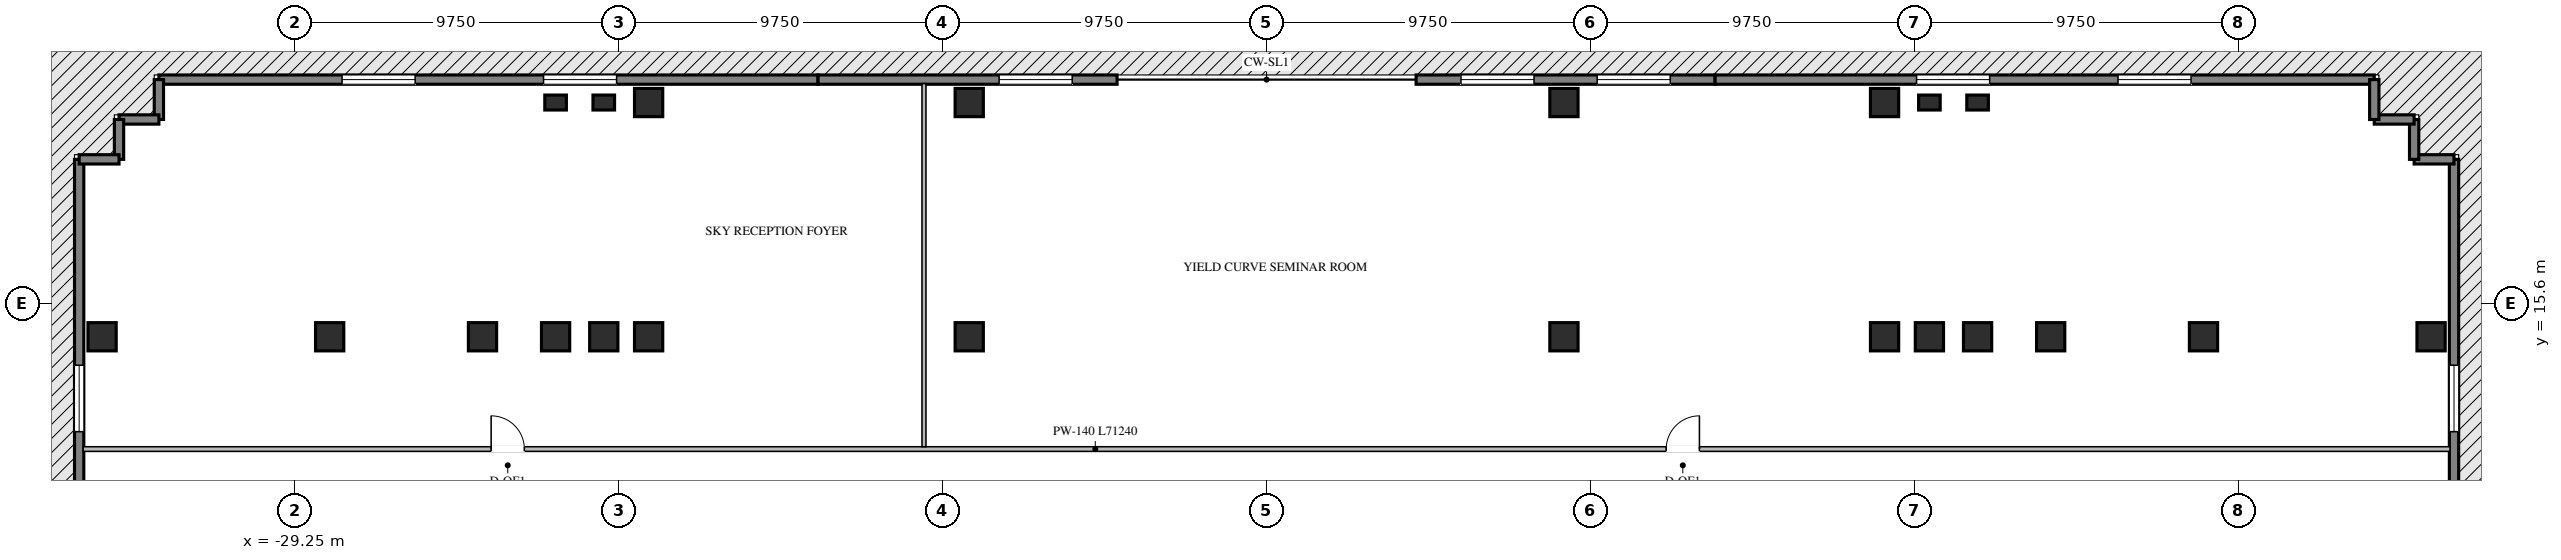
"""IFC4 building model, lengths in metres.
Left out: names, types, materials, properties, quantities, classifications, styles, units other than length and angle.
Written with IfcOpenShell. Run it as: python <this file> out.ifc"""

import sys

from ifc_helpers import new_model, si_unit, direction, frame, frame_2d, origin, origin_2d, place, context, subcontext, project, spatial, rectangle, i_section, extrude, element, fill, save


model = new_model("IFC4")
c1 = context("Model", 3, precision=1e-05, world=origin(), true_north=direction((0.0, 1.0)))
c2 = subcontext(c1, "Body", "Model", "MODEL_VIEW")
j1 = project(units=[si_unit("LENGTHUNIT", "METRE"), si_unit("PLANEANGLEUNIT", "RADIAN")], contexts=[c1])
p1 = place(None, origin())
s1 = spatial("IfcSite", under=j1, at=p1, CompositionType="ELEMENT")
p2 = place(p1, origin())
s2 = spatial("IfcBuilding", under=s1, at=p2, CompositionType="ELEMENT")
p3 = place(p2, frame((0.0, 0.0, 27.0)))
s3 = spatial("IfcBuildingStorey", under=s2, at=p3, CompositionType="ELEMENT", Elevation=27.0)
for number, where, z_axis, x_axis in (
    (1, (-21.4, 14.6, 0.0), (0.0, 0.0, 1.0), (1.0, 0.0, 0.0)),
    (2, (-19.95, 14.6, 0.0), (0.0, 0.0, 1.0), (1.0, 0.0, 0.0)),
    (3, (-18.6, 14.6, 0.0), (0.0, 0.0, 1.0), (1.0, 0.0, 0.0)),
    (4, (-8.95, 14.6, 0.0), (0.0, 0.0, 1.0), (1.0, 0.0, 0.0)),
    (5, (8.95, 14.6, 0.0), (0.0, 0.0, 1.0), (1.0, 0.0, 0.0)),
    (6, (18.6, 14.6, 0.0), (0.0, 0.0, 1.0), (1.0, 0.0, 0.0)),
    (7, (19.95, 14.6, 0.0), (0.0, 0.0, 1.0), (1.0, 0.0, 0.0)),
    (8, (21.4, 14.6, 0.0), (0.0, 0.0, 1.0), (1.0, 0.0, 0.0)),
    (9, (-23.6, 14.6, 0.0), (0.0, 0.0, 1.0), (1.0, 0.0, 0.0)),
    (10, (23.6, 14.6, 0.0), (0.0, 0.0, 1.0), (1.0, 0.0, 0.0)),
    (11, (-28.2, 14.6, 0.0), (0.0, 0.0, 1.0), (1.0, 0.0, 0.0)),
    (12, (28.2, 14.6, 0.0), (0.0, 0.0, 1.0), (1.0, 0.0, 0.0)),
    (13, (-18.6, 21.65, 0.0), (0.0, 0.0, 1.0), (1.0, 0.0, 0.0)),
    (14, (-8.95, 21.65, 0.0), (0.0, 0.0, 1.0), (1.0, 0.0, 0.0)),
    (15, (8.95, 21.65, 0.0), (0.0, 0.0, 1.0), (1.0, 0.0, 0.0)),
    (16, (18.6, 21.65, 0.0), (0.0, 0.0, 1.0), (1.0, 0.0, 0.0)),
    (17, (-35.05, 14.6, 0.0), (0.0, 0.0, 1.0), (1.0, 0.0, 0.0)),
    (18, (35.05, 14.6, 0.0), (0.0, 0.0, 1.0), (1.0, 0.0, 0.0)),
):
    element("IfcColumn", number, at=place(p3, frame(where, z_axis=z_axis, x_axis=x_axis)), inside=s3, PredefinedType="COLUMN", context=c2, shape_type="SweptSolid", body=[
        extrude(i_section(OverallWidth=0.85, OverallDepth=0.85, WebThickness=0.032, FlangeThickness=0.048, at=origin_2d()), origin(), (0.0, 0.0, 1.0), 4.2),
    ])
for number, where, z_axis, x_axis in (
    (19, (-21.4, 21.65, -0.28), (0.0, 0.0, 1.0), (1.0, 0.0, 0.0)),
    (20, (-19.95, 21.65, -0.28), (0.0, 0.0, 1.0), (1.0, 0.0, 0.0)),
    (21, (19.95, 21.65, -0.28), (0.0, 0.0, 1.0), (1.0, 0.0, 0.0)),
    (22, (21.4, 21.65, -0.28), (0.0, 0.0, 1.0), (1.0, 0.0, 0.0)),
):
    element("IfcColumn", number, at=place(p3, frame(where, z_axis=z_axis, x_axis=x_axis)), inside=s3, PredefinedType="PILASTER", context=c2, shape_type="SweptSolid", body=[
        extrude(rectangle(XDim=0.65, YDim=0.45, at=origin_2d()), origin(), (0.0, 0.0, 1.0), 4.48),
    ])
p4 = place(p3, frame((-33.34, 22.34, 0.0), z_axis=(0.0, 0.0, 1.0), x_axis=(1.0, 0.0, 0.0)))
e23 = element("IfcWall", 23, at=p4, inside=s3, PredefinedType="STANDARD", context=c2, shape_type="SweptSolid", body=[
    extrude(rectangle(XDim=19.84, YDim=0.28, at=frame_2d((9.92, 0.0))), origin(), (0.0, 0.0, 1.0), 4.0),
])
p5 = place(p4, frame((5.513, 0.0, 0.76)))
e24 = element("IfcOpeningElement", 24, at=p5, cuts=e23, PredefinedType="OPENING", context=c2, shape_type="SweptSolid", body=[
    extrude(rectangle(XDim=2.2, YDim=2.25, at=frame_2d((1.1, 1.125))), frame((0.0, 0.15, 0.0), z_axis=(0.0, -1.0, 0.0), x_axis=(1.0, 0.0, 0.0)), (0.0, 0.0, 1.0), 0.3),
])
p6 = place(p4, frame((11.577, 0.0, 0.76)))
e25 = element("IfcOpeningElement", 25, at=p6, cuts=e23, PredefinedType="OPENING", context=c2, shape_type="SweptSolid", body=[
    extrude(rectangle(XDim=2.2, YDim=2.25, at=frame_2d((1.1, 1.125))), frame((0.0, 0.15, 0.0), z_axis=(0.0, -1.0, 0.0), x_axis=(1.0, 0.0, 0.0)), (0.0, 0.0, 1.0), 0.3),
])
p7 = place(p3, frame((-13.5, 22.34, 0.0), z_axis=(0.0, 0.0, 1.0), x_axis=(1.0, 0.0, 0.0)))
e26 = element("IfcWall", 26, at=p7, inside=s3, PredefinedType="STANDARD", context=c2, shape_type="SweptSolid", body=[
    extrude(rectangle(XDim=9.0, YDim=0.28, at=frame_2d((4.5, 0.0))), origin(), (0.0, 0.0, 1.0), 4.0),
])
p8 = place(p7, frame((5.45, 0.0, 0.76)))
e27 = element("IfcOpeningElement", 27, at=p8, cuts=e26, PredefinedType="OPENING", context=c2, shape_type="SweptSolid", body=[
    extrude(rectangle(XDim=2.2, YDim=2.25, at=frame_2d((1.1, 1.125))), frame((0.0, 0.15, 0.0), z_axis=(0.0, -1.0, 0.0), x_axis=(1.0, 0.0, 0.0)), (0.0, 0.0, 1.0), 0.3),
])
p9 = place(p3, frame((4.5, 22.34, 0.0), z_axis=(0.0, 0.0, 1.0), x_axis=(1.0, 0.0, 0.0)))
e28 = element("IfcWall", 28, at=p9, inside=s3, PredefinedType="STANDARD", context=c2, shape_type="SweptSolid", body=[
    extrude(rectangle(XDim=9.0, YDim=0.28, at=frame_2d((4.5, 0.0))), origin(), (0.0, 0.0, 1.0), 4.0),
])
p10 = place(p9, frame((1.35, 0.0, 0.76)))
e29 = element("IfcOpeningElement", 29, at=p10, cuts=e28, PredefinedType="OPENING", context=c2, shape_type="SweptSolid", body=[
    extrude(rectangle(XDim=2.2, YDim=2.25, at=frame_2d((1.1, 1.125))), frame((0.0, 0.15, 0.0), z_axis=(0.0, -1.0, 0.0), x_axis=(1.0, 0.0, 0.0)), (0.0, 0.0, 1.0), 0.3),
])
p11 = place(p9, frame((5.45, 0.0, 0.76)))
e30 = element("IfcOpeningElement", 30, at=p11, cuts=e28, PredefinedType="OPENING", context=c2, shape_type="SweptSolid", body=[
    extrude(rectangle(XDim=2.2, YDim=2.25, at=frame_2d((1.1, 1.125))), frame((0.0, 0.15, 0.0), z_axis=(0.0, -1.0, 0.0), x_axis=(1.0, 0.0, 0.0)), (0.0, 0.0, 1.0), 0.3),
])
p12 = place(p3, frame((13.5, 22.34, 0.0), z_axis=(0.0, 0.0, 1.0), x_axis=(1.0, 0.0, 0.0)))
e31 = element("IfcWall", 31, at=p12, inside=s3, PredefinedType="STANDARD", context=c2, shape_type="SweptSolid", body=[
    extrude(rectangle(XDim=19.84, YDim=0.28, at=frame_2d((9.92, 0.0))), origin(), (0.0, 0.0, 1.0), 4.0),
])
p13 = place(p12, frame((6.063, 0.0, 0.76)))
e32 = element("IfcOpeningElement", 32, at=p13, cuts=e31, PredefinedType="OPENING", context=c2, shape_type="SweptSolid", body=[
    extrude(rectangle(XDim=2.2, YDim=2.25, at=frame_2d((1.1, 1.125))), frame((0.0, 0.15, 0.0), z_axis=(0.0, -1.0, 0.0), x_axis=(1.0, 0.0, 0.0)), (0.0, 0.0, 1.0), 0.3),
])
p14 = place(p12, frame((12.127, 0.0, 0.76)))
e33 = element("IfcOpeningElement", 33, at=p14, cuts=e31, PredefinedType="OPENING", context=c2, shape_type="SweptSolid", body=[
    extrude(rectangle(XDim=2.2, YDim=2.25, at=frame_2d((1.1, 1.125))), frame((0.0, 0.15, 0.0), z_axis=(0.0, -1.0, 0.0), x_axis=(1.0, 0.0, 0.0)), (0.0, 0.0, 1.0), 0.3),
])
p15 = place(p3, frame((-35.74, 0.0, 0.0), z_axis=(0.0, 0.0, 1.0), x_axis=(0.0, 1.0, 0.0)))
e34 = element("IfcWall", 34, at=p15, inside=s3, PredefinedType="STANDARD", context=c2, shape_type="SweptSolid", body=[
    extrude(rectangle(XDim=19.94, YDim=0.28, at=frame_2d((9.97, 0.0))), origin(), (0.0, 0.0, 1.0), 4.0),
])
p16 = place(p15, frame((5.647, 0.0, 0.76)))
e35 = element("IfcOpeningElement", 35, at=p16, cuts=e34, PredefinedType="OPENING", context=c2, shape_type="SweptSolid", body=[
    extrude(rectangle(XDim=2.0, YDim=2.05, at=frame_2d((1.0, 1.025))), frame((0.0, 0.15, 0.0), z_axis=(0.0, -1.0, 0.0), x_axis=(1.0, 0.0, 0.0)), (0.0, 0.0, 1.0), 0.3),
])
p17 = place(p15, frame((11.743, 0.0, 0.76)))
e36 = element("IfcOpeningElement", 36, at=p17, cuts=e34, PredefinedType="OPENING", context=c2, shape_type="SweptSolid", body=[
    extrude(rectangle(XDim=2.0, YDim=2.05, at=frame_2d((1.0, 1.025))), frame((0.0, 0.15, 0.0), z_axis=(0.0, -1.0, 0.0), x_axis=(1.0, 0.0, 0.0)), (0.0, 0.0, 1.0), 0.3),
])
p18 = place(p3, frame((35.74, 19.94, 0.0), z_axis=(0.0, 0.0, 1.0), x_axis=(0.0, -1.0, 0.0)))
e37 = element("IfcWall", 37, at=p18, inside=s3, PredefinedType="STANDARD", context=c2, shape_type="SweptSolid", body=[
    extrude(rectangle(XDim=19.94, YDim=0.28, at=frame_2d((9.97, 0.0))), origin(), (0.0, 0.0, 1.0), 4.0),
])
p19 = place(p18, frame((6.197, 0.0, 0.76)))
e38 = element("IfcOpeningElement", 38, at=p19, cuts=e37, PredefinedType="OPENING", context=c2, shape_type="SweptSolid", body=[
    extrude(rectangle(XDim=2.0, YDim=2.05, at=frame_2d((1.0, 1.025))), frame((0.0, 0.15, 0.0), z_axis=(0.0, -1.0, 0.0), x_axis=(1.0, 0.0, 0.0)), (0.0, 0.0, 1.0), 0.3),
])
p20 = place(p18, frame((12.293, 0.0, 0.76)))
e39 = element("IfcOpeningElement", 39, at=p20, cuts=e37, PredefinedType="OPENING", context=c2, shape_type="SweptSolid", body=[
    extrude(rectangle(XDim=2.0, YDim=2.05, at=frame_2d((1.0, 1.025))), frame((0.0, 0.15, 0.0), z_axis=(0.0, -1.0, 0.0), x_axis=(1.0, 0.0, 0.0)), (0.0, 0.0, 1.0), 0.3),
])
for number, where, z_axis, x_axis in (
    (40, (35.74, 19.94, 0.0), (0.0, 0.0, 1.0), (-1.0, 0.0, 0.0)),
    (41, (34.54, 19.94, 0.0), (0.0, 0.0, 1.0), (0.0, 1.0, 0.0)),
    (42, (34.54, 21.14, 0.0), (0.0, 0.0, 1.0), (-1.0, 0.0, 0.0)),
):
    element("IfcWall", number, at=place(p3, frame(where, z_axis=z_axis, x_axis=x_axis)), inside=s3, PredefinedType="STANDARD", context=c2, shape_type="SweptSolid", body=[
        extrude(rectangle(XDim=1.2, YDim=0.28, at=frame_2d((0.6, 0.0))), origin(), (0.0, 0.0, 1.0), 4.0),
    ])
for number, where, z_axis, x_axis in (
    (43, (33.34, 21.14, 0.0), (0.0, 0.0, 1.0), (0.0, 1.0, 0.0)),
    (44, (-33.34, 22.34, 0.0), (0.0, 0.0, 1.0), (0.0, -1.0, 0.0)),
):
    element("IfcWall", number, at=place(p3, frame(where, z_axis=z_axis, x_axis=x_axis)), inside=s3, PredefinedType="STANDARD", context=c2, shape_type="SweptSolid", body=[
        extrude(rectangle(XDim=1.2, YDim=0.28, at=frame_2d((0.6, 0.0))), origin(), (0.0, 0.0, 1.0), 4.0),
    ])
for number, where, z_axis, x_axis in (
    (45, (-33.34, 21.14, 0.0), (0.0, 0.0, 1.0), (-1.0, 0.0, 0.0)),
    (46, (-34.54, 21.14, 0.0), (0.0, 0.0, 1.0), (0.0, -1.0, 0.0)),
    (47, (-34.54, 19.94, 0.0), (0.0, 0.0, 1.0), (-1.0, 0.0, 0.0)),
):
    element("IfcWall", number, at=place(p3, frame(where, z_axis=z_axis, x_axis=x_axis)), inside=s3, PredefinedType="STANDARD", context=c2, shape_type="SweptSolid", body=[
        extrude(rectangle(XDim=1.2, YDim=0.28, at=frame_2d((0.6, 0.0))), origin(), (0.0, 0.0, 1.0), 4.0),
    ])
p21 = place(p3, frame((-35.62, 11.22, 0.0), z_axis=(0.0, 0.0, 1.0), x_axis=(1.0, 0.0, 0.0)))
e48 = element("IfcWall", 48, at=p21, inside=s3, PredefinedType="STANDARD", context=c2, shape_type="SweptSolid", body=[
    extrude(rectangle(XDim=71.24, YDim=0.14, at=frame_2d((35.62, 0.0))), origin(), (0.0, 0.0, 1.0), 4.0),
])
p22 = place(p21, frame((12.28, 0.0, 0.0)))
e49 = element("IfcOpeningElement", 49, at=p22, cuts=e48, PredefinedType="OPENING", context=c2, shape_type="SweptSolid", body=[
    extrude(rectangle(XDim=1.0, YDim=2.08, at=frame_2d((0.5, 1.04))), frame((0.0, 0.08, 0.0), z_axis=(0.0, -1.0, 0.0), x_axis=(1.0, 0.0, 0.0)), (0.0, 0.0, 1.0), 0.16),
])
p23 = place(p21, frame((47.648, 0.0, 0.0)))
e50 = element("IfcOpeningElement", 50, at=p23, cuts=e48, PredefinedType="OPENING", context=c2, shape_type="SweptSolid", body=[
    extrude(rectangle(XDim=1.0, YDim=2.08, at=frame_2d((0.5, 1.04))), frame((0.0, 0.08, 0.0), z_axis=(0.0, -1.0, 0.0), x_axis=(1.0, 0.0, 0.0)), (0.0, 0.0, 1.0), 0.16),
])
p24 = place(p3, frame((-10.312, 11.29, 0.0), z_axis=(0.0, 0.0, 1.0), x_axis=(0.0, 1.0, 0.0)))
e51 = element("IfcWall", 51, at=p24, inside=s3, PredefinedType="STANDARD", context=c2, shape_type="SweptSolid", body=[
    extrude(rectangle(XDim=10.93, YDim=0.12, at=frame_2d((5.465, 0.0))), origin(), (0.0, 0.0, 1.0), 4.0),
])
p25 = place(p5, origin())
e52 = element("IfcWindow", 52, at=p25, inside=s3, PartitioningType="DOUBLE_PANEL_VERTICAL", PredefinedType="WINDOW", context=c2, shape_type="SweptSolid", body=[
    extrude(rectangle(XDim=2.2, YDim=2.25, at=frame_2d((1.1, 1.125))), frame((0.0, 0.03, 0.0), z_axis=(0.0, -1.0, 0.0), x_axis=(1.0, 0.0, 0.0)), (0.0, 0.0, 1.0), 0.06),
])
fill(e24, e52)
p26 = place(p6, origin())
e53 = element("IfcWindow", 53, at=p26, inside=s3, PartitioningType="DOUBLE_PANEL_VERTICAL", PredefinedType="WINDOW", context=c2, shape_type="SweptSolid", body=[
    extrude(rectangle(XDim=2.2, YDim=2.25, at=frame_2d((1.1, 1.125))), frame((0.0, 0.03, 0.0), z_axis=(0.0, -1.0, 0.0), x_axis=(1.0, 0.0, 0.0)), (0.0, 0.0, 1.0), 0.06),
])
fill(e25, e53)
p27 = place(p8, origin())
e54 = element("IfcWindow", 54, at=p27, inside=s3, PartitioningType="DOUBLE_PANEL_VERTICAL", PredefinedType="WINDOW", context=c2, shape_type="SweptSolid", body=[
    extrude(rectangle(XDim=2.2, YDim=2.25, at=frame_2d((1.1, 1.125))), frame((0.0, 0.03, 0.0), z_axis=(0.0, -1.0, 0.0), x_axis=(1.0, 0.0, 0.0)), (0.0, 0.0, 1.0), 0.06),
])
fill(e27, e54)
p28 = place(p10, origin())
e55 = element("IfcWindow", 55, at=p28, inside=s3, PartitioningType="DOUBLE_PANEL_VERTICAL", PredefinedType="WINDOW", context=c2, shape_type="SweptSolid", body=[
    extrude(rectangle(XDim=2.2, YDim=2.25, at=frame_2d((1.1, 1.125))), frame((0.0, 0.03, 0.0), z_axis=(0.0, -1.0, 0.0), x_axis=(1.0, 0.0, 0.0)), (0.0, 0.0, 1.0), 0.06),
])
fill(e29, e55)
p29 = place(p11, origin())
e56 = element("IfcWindow", 56, at=p29, inside=s3, PartitioningType="DOUBLE_PANEL_VERTICAL", PredefinedType="WINDOW", context=c2, shape_type="SweptSolid", body=[
    extrude(rectangle(XDim=2.2, YDim=2.25, at=frame_2d((1.1, 1.125))), frame((0.0, 0.03, 0.0), z_axis=(0.0, -1.0, 0.0), x_axis=(1.0, 0.0, 0.0)), (0.0, 0.0, 1.0), 0.06),
])
fill(e30, e56)
p30 = place(p13, origin())
e57 = element("IfcWindow", 57, at=p30, inside=s3, PartitioningType="DOUBLE_PANEL_VERTICAL", PredefinedType="WINDOW", context=c2, shape_type="SweptSolid", body=[
    extrude(rectangle(XDim=2.2, YDim=2.25, at=frame_2d((1.1, 1.125))), frame((0.0, 0.03, 0.0), z_axis=(0.0, -1.0, 0.0), x_axis=(1.0, 0.0, 0.0)), (0.0, 0.0, 1.0), 0.06),
])
fill(e32, e57)
p31 = place(p14, origin())
e58 = element("IfcWindow", 58, at=p31, inside=s3, PartitioningType="DOUBLE_PANEL_VERTICAL", PredefinedType="WINDOW", context=c2, shape_type="SweptSolid", body=[
    extrude(rectangle(XDim=2.2, YDim=2.25, at=frame_2d((1.1, 1.125))), frame((0.0, 0.03, 0.0), z_axis=(0.0, -1.0, 0.0), x_axis=(1.0, 0.0, 0.0)), (0.0, 0.0, 1.0), 0.06),
])
fill(e33, e58)
p32 = place(p17, origin())
e59 = element("IfcWindow", 59, at=p32, inside=s3, PartitioningType="DOUBLE_PANEL_VERTICAL", PredefinedType="WINDOW", context=c2, shape_type="SweptSolid", body=[
    extrude(rectangle(XDim=2.0, YDim=2.05, at=frame_2d((1.0, 1.025))), frame((0.0, 0.03, 0.0), z_axis=(0.0, -1.0, 0.0), x_axis=(1.0, 0.0, 0.0)), (0.0, 0.0, 1.0), 0.06),
])
fill(e36, e59)
p33 = place(p19, origin())
e60 = element("IfcWindow", 60, at=p33, inside=s3, PartitioningType="DOUBLE_PANEL_VERTICAL", PredefinedType="WINDOW", context=c2, shape_type="SweptSolid", body=[
    extrude(rectangle(XDim=2.0, YDim=2.05, at=frame_2d((1.0, 1.025))), frame((0.0, 0.03, 0.0), z_axis=(0.0, -1.0, 0.0), x_axis=(1.0, 0.0, 0.0)), (0.0, 0.0, 1.0), 0.06),
])
fill(e38, e60)
p34 = place(p22, origin())
e61 = element("IfcDoor", 61, at=p34, inside=s3, OperationType="SINGLE_SWING_LEFT", PredefinedType="DOOR", context=c2, shape_type="SweptSolid", body=[
    extrude(rectangle(XDim=1.0, YDim=2.08, at=frame_2d((0.5, 1.04))), frame((0.0, 0.025, 0.0), z_axis=(0.0, -1.0, 0.0), x_axis=(1.0, 0.0, 0.0)), (0.0, 0.0, 1.0), 0.05),
])
fill(e49, e61)
p35 = place(p23, origin())
e62 = element("IfcDoor", 62, at=p35, inside=s3, OperationType="SINGLE_SWING_RIGHT", PredefinedType="DOOR", context=c2, shape_type="SweptSolid", body=[
    extrude(rectangle(XDim=1.0, YDim=2.08, at=frame_2d((0.5, 1.04))), frame((0.0, 0.025, 0.0), z_axis=(0.0, -1.0, 0.0), x_axis=(1.0, 0.0, 0.0)), (0.0, 0.0, 1.0), 0.05),
])
fill(e50, e62)
save(model, sys.argv[1])
